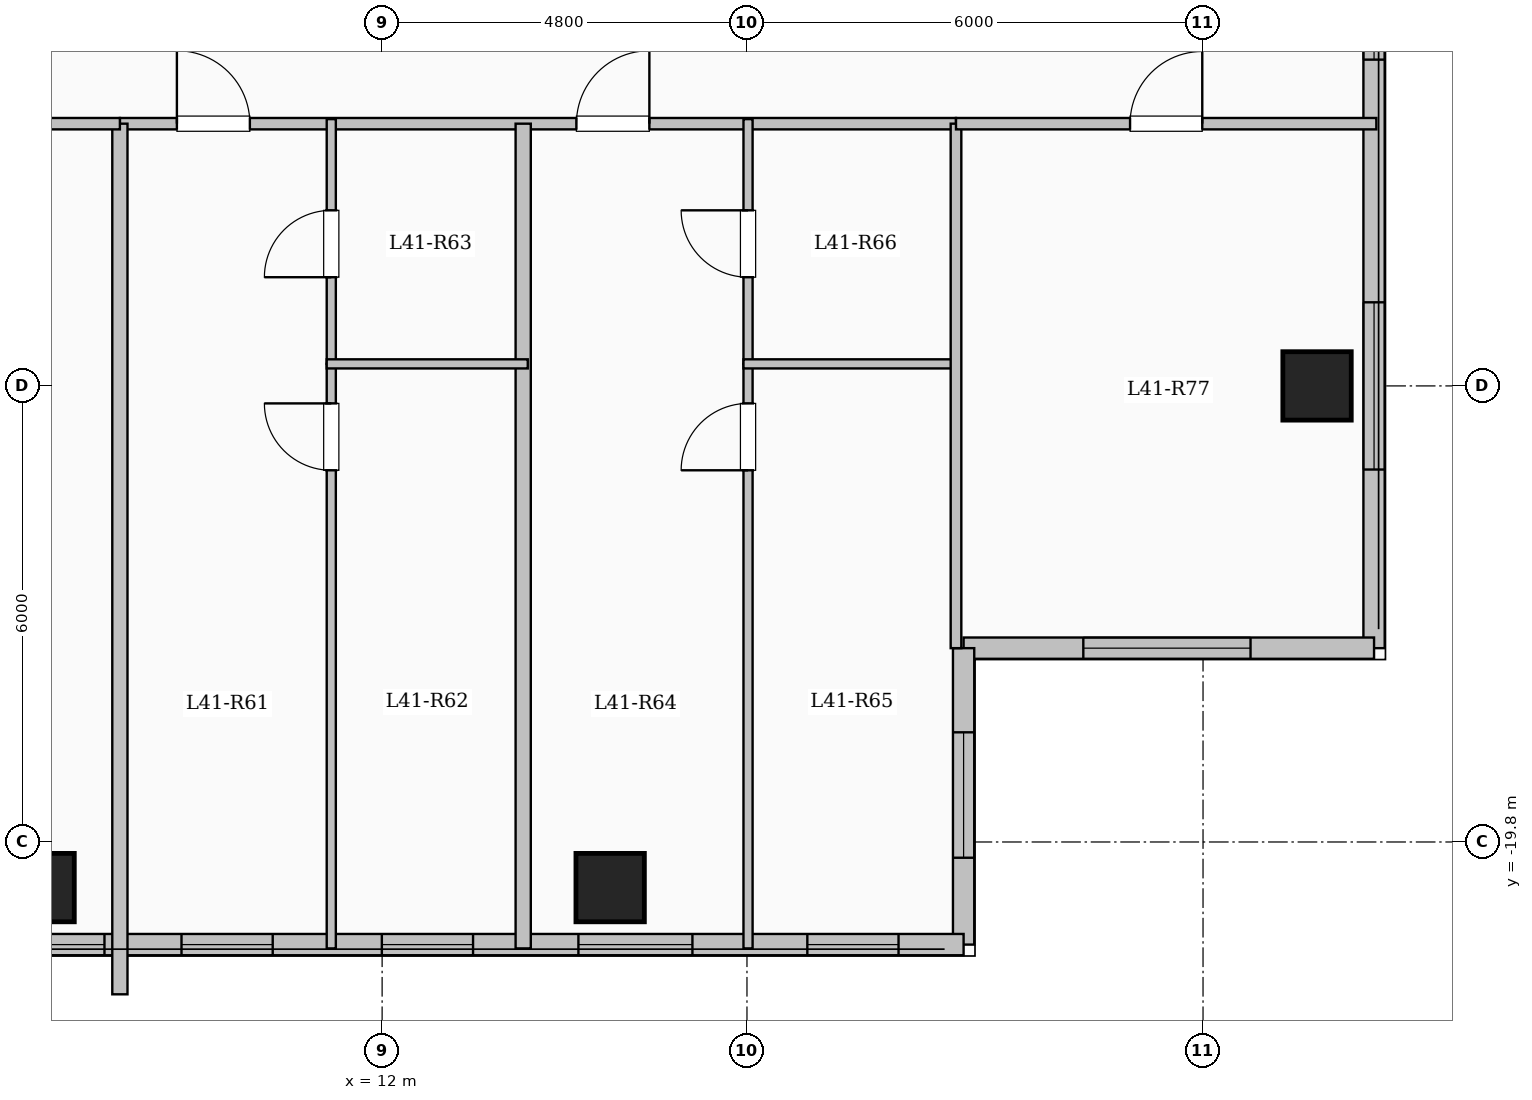
"""IFC4 building model, lengths in metres.
Left out: names, types, materials, properties, quantities, classifications, styles, units other than length and angle.
Written with IfcOpenShell. Run it as: python <this file> out.ifc"""

import sys

from ifc_helpers import new_model, si_unit, direction, frame, frame_2d, origin, origin_2d, place, context, subcontext, project, spatial, rectangle, extrude, element, fill, save


model = new_model("IFC4")
c1 = context("Model", 3, precision=1e-05, world=origin(), true_north=direction((0.0, 1.0)))
c2 = subcontext(c1, "Body", "Model", "MODEL_VIEW")
j1 = project(units=[si_unit("LENGTHUNIT", "METRE"), si_unit("PLANEANGLEUNIT", "RADIAN")], contexts=[c1])
p1 = place(None, origin())
s1 = spatial("IfcSite", under=j1, at=p1, CompositionType="ELEMENT")
p2 = place(p1, origin())
s2 = spatial("IfcBuilding", under=s1, at=p2, CompositionType="ELEMENT")
p3 = place(p2, frame((0.0, 0.0, 152.7)))
s3 = spatial("IfcBuildingStorey", under=s2, at=p3, CompositionType="ELEMENT", Elevation=152.7)
for number, where, z_axis, x_axis in (
    (1, (7.5, -20.4, 0.0), (0.0, 0.0, 1.0), (1.0, 0.0, 0.0)),
    (2, (15.0, -20.4, 0.0), (0.0, 0.0, 1.0), (1.0, 0.0, 0.0)),
    (3, (24.3, -13.8, 0.0), (0.0, 0.0, 1.0), (1.0, 0.0, 0.0)),
):
    element("IfcColumn", number, at=place(p3, frame(where, z_axis=z_axis, x_axis=x_axis)), inside=s3, PredefinedType="COLUMN", context=c2, shape_type="SweptSolid", body=[
        extrude(rectangle(XDim=0.9, YDim=0.9, at=origin_2d()), origin(), (0.0, 0.0, 1.0), 3.35),
    ])
p4 = place(p3, frame((25.05, 17.25, 0.0), z_axis=(0.0, 0.0, 1.0), x_axis=(0.0, -1.0, 0.0)))
e4 = element("IfcWall", 4, at=p4, inside=s3, PredefinedType="SOLIDWALL", context=c2, shape_type="SweptSolid", body=[
    extrude(rectangle(XDim=34.5, YDim=0.28, at=frame_2d((17.25, 0.0))), origin(), (0.0, 0.0, 1.0), 3.1),
])
p5 = place(p4, frame((1.375, 0.0, 0.9)))
e5 = element("IfcOpeningElement", 5, at=p5, cuts=e4, PredefinedType="OPENING", context=c2, shape_type="SweptSolid", body=[
    extrude(rectangle(XDim=2.0, YDim=1.7, at=frame_2d((1.0, 0.85))), frame((0.0, 0.15, 0.0), z_axis=(0.0, -1.0, 0.0), x_axis=(1.0, 0.0, 0.0)), (0.0, 0.0, 1.0), 0.3),
])
p6 = place(p4, frame((5.125, 0.0, 0.95)))
e6 = element("IfcOpeningElement", 6, at=p6, cuts=e4, PredefinedType="OPENING", context=c2, shape_type="SweptSolid", body=[
    extrude(rectangle(XDim=1.0, YDim=1.5, at=frame_2d((0.5, 0.75))), frame((0.0, 0.15, 0.0), z_axis=(0.0, -1.0, 0.0), x_axis=(1.0, 0.0, 0.0)), (0.0, 0.0, 1.0), 0.3),
])
p7 = place(p4, frame((14.5, 0.0, 0.9)))
e7 = element("IfcOpeningElement", 7, at=p7, cuts=e4, PredefinedType="OPENING", context=c2, shape_type="SweptSolid", body=[
    extrude(rectangle(XDim=2.0, YDim=1.7, at=frame_2d((1.0, 0.85))), frame((0.0, 0.15, 0.0), z_axis=(0.0, -1.0, 0.0), x_axis=(1.0, 0.0, 0.0)), (0.0, 0.0, 1.0), 0.3),
])
p8 = place(p4, frame((25.258, 0.0, 0.9)))
e8 = element("IfcOpeningElement", 8, at=p8, cuts=e4, PredefinedType="OPENING", context=c2, shape_type="SweptSolid", body=[
    extrude(rectangle(XDim=1.5, YDim=1.65, at=frame_2d((0.75, 0.825))), frame((0.0, 0.15, 0.0), z_axis=(0.0, -1.0, 0.0), x_axis=(1.0, 0.0, 0.0)), (0.0, 0.0, 1.0), 0.3),
])
p9 = place(p4, frame((29.95, 0.0, 0.9)))
e9 = element("IfcOpeningElement", 9, at=p9, cuts=e4, PredefinedType="OPENING", context=c2, shape_type="SweptSolid", body=[
    extrude(rectangle(XDim=2.2, YDim=1.75, at=frame_2d((1.1, 0.875))), frame((0.0, 0.15, 0.0), z_axis=(0.0, -1.0, 0.0), x_axis=(1.0, 0.0, 0.0)), (0.0, 0.0, 1.0), 0.3),
])
p10 = place(p3, frame((25.05, -17.25, 0.0), z_axis=(0.0, 0.0, 1.0), x_axis=(-1.0, 0.0, 0.0)))
e10 = element("IfcWall", 10, at=p10, inside=s3, PredefinedType="SOLIDWALL", context=c2, shape_type="SweptSolid", body=[
    extrude(rectangle(XDim=5.4, YDim=0.28, at=frame_2d((2.7, 0.0))), origin(), (0.0, 0.0, 1.0), 3.1),
])
p11 = place(p10, frame((1.625, 0.0, 0.9)))
e11 = element("IfcOpeningElement", 11, at=p11, cuts=e10, PredefinedType="OPENING", context=c2, shape_type="SweptSolid", body=[
    extrude(rectangle(XDim=2.2, YDim=1.75, at=frame_2d((1.1, 0.875))), frame((0.0, 0.15, 0.0), z_axis=(0.0, -1.0, 0.0), x_axis=(1.0, 0.0, 0.0)), (0.0, 0.0, 1.0), 0.3),
])
p12 = place(p3, frame((19.65, -17.25, 0.0), z_axis=(0.0, 0.0, 1.0), x_axis=(0.0, -1.0, 0.0)))
e12 = element("IfcWall", 12, at=p12, inside=s3, PredefinedType="SOLIDWALL", context=c2, shape_type="SweptSolid", body=[
    extrude(rectangle(XDim=3.9, YDim=0.28, at=frame_2d((1.95, 0.0))), origin(), (0.0, 0.0, 1.0), 3.1),
])
p13 = place(p12, frame((1.107, 0.0, 0.9)))
e13 = element("IfcOpeningElement", 13, at=p13, cuts=e12, PredefinedType="OPENING", context=c2, shape_type="SweptSolid", body=[
    extrude(rectangle(XDim=1.65, YDim=1.6, at=frame_2d((0.825, 0.8))), frame((0.0, 0.15, 0.0), z_axis=(0.0, -1.0, 0.0), x_axis=(1.0, 0.0, 0.0)), (0.0, 0.0, 1.0), 0.3),
])
p14 = place(p3, frame((19.65, -21.15, 0.0), z_axis=(0.0, 0.0, 1.0), x_axis=(-1.0, 0.0, 0.0)))
e14 = element("IfcWall", 14, at=p14, inside=s3, PredefinedType="SOLIDWALL", context=c2, shape_type="SweptSolid", body=[
    extrude(rectangle(XDim=12.3, YDim=0.28, at=frame_2d((6.15, 0.0))), origin(), (0.0, 0.0, 1.0), 3.1),
])
p15 = place(p14, frame((0.856, 0.0, 0.95)))
e15 = element("IfcOpeningElement", 15, at=p15, cuts=e14, PredefinedType="OPENING", context=c2, shape_type="SweptSolid", body=[
    extrude(rectangle(XDim=1.2, YDim=1.5, at=frame_2d((0.6, 0.75))), frame((0.0, 0.15, 0.0), z_axis=(0.0, -1.0, 0.0), x_axis=(1.0, 0.0, 0.0)), (0.0, 0.0, 1.0), 0.3),
])
p16 = place(p14, frame((3.568, 0.0, 0.9)))
e16 = element("IfcOpeningElement", 16, at=p16, cuts=e14, PredefinedType="OPENING", context=c2, shape_type="SweptSolid", body=[
    extrude(rectangle(XDim=1.5, YDim=1.65, at=frame_2d((0.75, 0.825))), frame((0.0, 0.15, 0.0), z_axis=(0.0, -1.0, 0.0), x_axis=(1.0, 0.0, 0.0)), (0.0, 0.0, 1.0), 0.3),
])
p17 = place(p14, frame((6.454, 0.0, 0.95)))
e17 = element("IfcOpeningElement", 17, at=p17, cuts=e14, PredefinedType="OPENING", context=c2, shape_type="SweptSolid", body=[
    extrude(rectangle(XDim=1.2, YDim=1.5, at=frame_2d((0.6, 0.75))), frame((0.0, 0.15, 0.0), z_axis=(0.0, -1.0, 0.0), x_axis=(1.0, 0.0, 0.0)), (0.0, 0.0, 1.0), 0.3),
])
p18 = place(p14, frame((9.089, 0.0, 0.95)))
e18 = element("IfcOpeningElement", 18, at=p18, cuts=e14, PredefinedType="OPENING", context=c2, shape_type="SweptSolid", body=[
    extrude(rectangle(XDim=1.2, YDim=1.5, at=frame_2d((0.6, 0.75))), frame((0.0, 0.15, 0.0), z_axis=(0.0, -1.0, 0.0), x_axis=(1.0, 0.0, 0.0)), (0.0, 0.0, 1.0), 0.3),
])
p19 = place(p14, frame((11.303, 0.0, 0.95)))
e19 = element("IfcOpeningElement", 19, at=p19, cuts=e14, PredefinedType="OPENING", context=c2, shape_type="SweptSolid", body=[
    extrude(rectangle(XDim=0.85, YDim=1.5, at=frame_2d((0.425, 0.75))), frame((0.0, 0.15, 0.0), z_axis=(0.0, -1.0, 0.0), x_axis=(1.0, 0.0, 0.0)), (0.0, 0.0, 1.0), 0.3),
])
p20 = place(p3, frame((8.55, -10.35, 0.0), z_axis=(0.0, 0.0, 1.0), x_axis=(1.0, 0.0, 0.0)))
e20 = element("IfcWall", 20, at=p20, inside=s3, PredefinedType="PARTITIONING", context=c2, shape_type="SweptSolid", body=[
    extrude(rectangle(XDim=11.0, YDim=0.15, at=frame_2d((5.5, 0.0))), origin(), (0.0, 0.0, 1.0), 3.1),
])
p21 = place(p20, frame((0.75, 0.0, 0.0)))
e21 = element("IfcOpeningElement", 21, at=p21, cuts=e20, PredefinedType="OPENING", context=c2, shape_type="SweptSolid", body=[
    extrude(rectangle(XDim=0.96, YDim=2.15, at=frame_2d((0.48, 1.075))), frame((0.0, 0.085, 0.0), z_axis=(0.0, -1.0, 0.0), x_axis=(1.0, 0.0, 0.0)), (0.0, 0.0, 1.0), 0.17),
])
p22 = place(p20, frame((6.006, 0.0, 0.0)))
e22 = element("IfcOpeningElement", 22, at=p22, cuts=e20, PredefinedType="OPENING", context=c2, shape_type="SweptSolid", body=[
    extrude(rectangle(XDim=0.96, YDim=2.15, at=frame_2d((0.48, 1.075))), frame((0.0, 0.085, 0.0), z_axis=(0.0, -1.0, 0.0), x_axis=(1.0, 0.0, 0.0)), (0.0, 0.0, 1.0), 0.17),
])
p23 = place(p3, frame((13.856, -21.2, 0.0), z_axis=(0.0, 0.0, 1.0), x_axis=(0.0, 1.0, 0.0)))
e23 = element("IfcWall", 23, at=p23, inside=s3, PredefinedType="SOLIDWALL", context=c2, shape_type="SweptSolid", body=[
    extrude(rectangle(XDim=10.85, YDim=0.2, at=frame_2d((5.425, 0.0))), origin(), (0.0, 0.0, 1.0), 3.1),
])
p24 = place(p3, frame((11.331, -21.2, 0.0), z_axis=(0.0, 0.0, 1.0), x_axis=(0.0, 1.0, 0.0)))
e24 = element("IfcWall", 24, at=p24, inside=s3, PredefinedType="PARTITIONING", context=c2, shape_type="SweptSolid", body=[
    extrude(rectangle(XDim=7.69, YDim=0.12, at=frame_2d((3.845, 0.0))), origin(), (0.0, 0.0, 1.0), 3.1),
])
p25 = place(p24, frame((6.29, 0.0, 0.0)))
e25 = element("IfcOpeningElement", 25, at=p25, cuts=e24, PredefinedType="OPENING", context=c2, shape_type="SweptSolid", body=[
    extrude(rectangle(XDim=0.88, YDim=2.1, at=frame_2d((0.44, 1.05))), frame((0.0, 0.07, 0.0), z_axis=(0.0, -1.0, 0.0), x_axis=(1.0, 0.0, 0.0)), (0.0, 0.0, 1.0), 0.14),
])
p26 = place(p3, frame((11.331, -13.51, 0.0), z_axis=(0.0, 0.0, 1.0), x_axis=(0.0, 1.0, 0.0)))
e26 = element("IfcWall", 26, at=p26, inside=s3, PredefinedType="PARTITIONING", context=c2, shape_type="SweptSolid", body=[
    extrude(rectangle(XDim=3.22, YDim=0.12, at=frame_2d((1.61, 0.0))), origin(), (0.0, 0.0, 1.0), 3.1),
])
p27 = place(p26, frame((1.14, 0.0, 0.0)))
e27 = element("IfcOpeningElement", 27, at=p27, cuts=e26, PredefinedType="OPENING", context=c2, shape_type="SweptSolid", body=[
    extrude(rectangle(XDim=0.88, YDim=2.1, at=frame_2d((0.44, 1.05))), frame((0.0, 0.07, 0.0), z_axis=(0.0, -1.0, 0.0), x_axis=(1.0, 0.0, 0.0)), (0.0, 0.0, 1.0), 0.14),
])
p28 = place(p3, frame((11.271, -13.51, 0.0), z_axis=(0.0, 0.0, 1.0), x_axis=(1.0, 0.0, 0.0)))
e28 = element("IfcWall", 28, at=p28, inside=s3, PredefinedType="PARTITIONING", context=c2, shape_type="SweptSolid", body=[
    extrude(rectangle(XDim=2.645, YDim=0.12, at=frame_2d((1.323, 0.0))), origin(), (0.0, 0.0, 1.0), 3.1),
])
p29 = place(p3, frame((16.814, -21.2, 0.0), z_axis=(0.0, 0.0, 1.0), x_axis=(0.0, 1.0, 0.0)))
e29 = element("IfcWall", 29, at=p29, inside=s3, PredefinedType="PARTITIONING", context=c2, shape_type="SweptSolid", body=[
    extrude(rectangle(XDim=7.69, YDim=0.12, at=frame_2d((3.845, 0.0))), origin(), (0.0, 0.0, 1.0), 3.1),
])
p30 = place(p29, frame((6.29, 0.0, 0.0)))
e30 = element("IfcOpeningElement", 30, at=p30, cuts=e29, PredefinedType="OPENING", context=c2, shape_type="SweptSolid", body=[
    extrude(rectangle(XDim=0.88, YDim=2.1, at=frame_2d((0.44, 1.05))), frame((0.0, 0.07, 0.0), z_axis=(0.0, -1.0, 0.0), x_axis=(1.0, 0.0, 0.0)), (0.0, 0.0, 1.0), 0.14),
])
p31 = place(p3, frame((16.814, -13.51, 0.0), z_axis=(0.0, 0.0, 1.0), x_axis=(0.0, 1.0, 0.0)))
e31 = element("IfcWall", 31, at=p31, inside=s3, PredefinedType="PARTITIONING", context=c2, shape_type="SweptSolid", body=[
    extrude(rectangle(XDim=3.22, YDim=0.12, at=frame_2d((1.61, 0.0))), origin(), (0.0, 0.0, 1.0), 3.1),
])
p32 = place(p31, frame((1.14, 0.0, 0.0)))
e32 = element("IfcOpeningElement", 32, at=p32, cuts=e31, PredefinedType="OPENING", context=c2, shape_type="SweptSolid", body=[
    extrude(rectangle(XDim=0.88, YDim=2.1, at=frame_2d((0.44, 1.05))), frame((0.0, 0.07, 0.0), z_axis=(0.0, -1.0, 0.0), x_axis=(1.0, 0.0, 0.0)), (0.0, 0.0, 1.0), 0.14),
])
p33 = place(p3, frame((16.754, -13.51, 0.0), z_axis=(0.0, 0.0, 1.0), x_axis=(1.0, 0.0, 0.0)))
e33 = element("IfcWall", 33, at=p33, inside=s3, PredefinedType="PARTITIONING", context=c2, shape_type="SweptSolid", body=[
    extrude(rectangle(XDim=2.856, YDim=0.12, at=frame_2d((1.428, 0.0))), origin(), (0.0, 0.0, 1.0), 3.1),
])
p34 = place(p3, frame((8.55, -21.804, 0.0), z_axis=(0.0, 0.0, 1.0), x_axis=(0.0, 1.0, 0.0)))
e34 = element("IfcWall", 34, at=p34, inside=s3, PredefinedType="SOLIDWALL", context=c2, shape_type="SweptSolid", body=[
    extrude(rectangle(XDim=11.454, YDim=0.2, at=frame_2d((5.727, 0.0))), origin(), (0.0, 0.0, 1.0), 3.1),
])
p35 = place(p3, frame((-8.55, -10.35, 0.0), z_axis=(0.0, 0.0, 1.0), x_axis=(1.0, 0.0, 0.0)))
e35 = element("IfcWall", 35, at=p35, inside=s3, PredefinedType="PARTITIONING", context=c2, shape_type="SweptSolid", body=[
    extrude(rectangle(XDim=17.1, YDim=0.15, at=frame_2d((8.55, 0.0))), origin(), (0.0, 0.0, 1.0), 3.1),
])
p36 = place(p35, frame((1.6, 0.0, 0.0)))
e36 = element("IfcOpeningElement", 36, at=p36, cuts=e35, PredefinedType="OPENING", context=c2, shape_type="SweptSolid", body=[
    extrude(rectangle(XDim=0.95, YDim=2.15, at=frame_2d((0.475, 1.075))), frame((0.0, 0.085, 0.0), z_axis=(0.0, -1.0, 0.0), x_axis=(1.0, 0.0, 0.0)), (0.0, 0.0, 1.0), 0.17),
])
p37 = place(p35, frame((10.5, 0.0, 0.0)))
e37 = element("IfcOpeningElement", 37, at=p37, cuts=e35, PredefinedType="OPENING", context=c2, shape_type="SweptSolid", body=[
    extrude(rectangle(XDim=0.95, YDim=2.15, at=frame_2d((0.475, 1.075))), frame((0.0, 0.085, 0.0), z_axis=(0.0, -1.0, 0.0), x_axis=(1.0, 0.0, 0.0)), (0.0, 0.0, 1.0), 0.17),
])
p38 = place(p3, frame((19.55, -17.25, 0.0), z_axis=(0.0, 0.0, 1.0), x_axis=(0.0, 1.0, 0.0)))
e38 = element("IfcWall", 38, at=p38, inside=s3, PredefinedType="PARTITIONING", context=c2, shape_type="SweptSolid", body=[
    extrude(rectangle(XDim=6.9, YDim=0.14, at=frame_2d((3.45, 0.0))), origin(), (0.0, 0.0, 1.0), 3.1),
])
p39 = place(p3, frame((19.55, -10.35, 0.0), z_axis=(0.0, 0.0, 1.0), x_axis=(1.0, 0.0, 0.0)))
e39 = element("IfcWall", 39, at=p39, inside=s3, PredefinedType="PARTITIONING", context=c2, shape_type="SweptSolid", body=[
    extrude(rectangle(XDim=5.53, YDim=0.15, at=frame_2d((2.765, 0.0))), origin(), (0.0, 0.0, 1.0), 3.1),
])
p40 = place(p39, frame((2.29, 0.0, 0.0)))
e40 = element("IfcOpeningElement", 40, at=p40, cuts=e39, PredefinedType="OPENING", context=c2, shape_type="SweptSolid", body=[
    extrude(rectangle(XDim=0.95, YDim=2.15, at=frame_2d((0.475, 1.075))), frame((0.0, 0.085, 0.0), z_axis=(0.0, -1.0, 0.0), x_axis=(1.0, 0.0, 0.0)), (0.0, 0.0, 1.0), 0.17),
])
p41 = place(p8, origin())
e41 = element("IfcWindow", 41, at=p41, inside=s3, PartitioningType="SINGLE_PANEL", PredefinedType="WINDOW", context=c2, shape_type="SweptSolid", body=[
    extrude(rectangle(XDim=1.5, YDim=1.65, at=frame_2d((0.75, 0.825))), frame((0.0, 0.03, 0.0), z_axis=(0.0, -1.0, 0.0), x_axis=(1.0, 0.0, 0.0)), (0.0, 0.0, 1.0), 0.06),
])
fill(e8, e41)
p42 = place(p9, origin())
e42 = element("IfcWindow", 42, at=p42, inside=s3, PartitioningType="SINGLE_PANEL", PredefinedType="WINDOW", context=c2, shape_type="SweptSolid", body=[
    extrude(rectangle(XDim=2.2, YDim=1.75, at=frame_2d((1.1, 0.875))), frame((0.0, 0.03, 0.0), z_axis=(0.0, -1.0, 0.0), x_axis=(1.0, 0.0, 0.0)), (0.0, 0.0, 1.0), 0.06),
])
fill(e9, e42)
p43 = place(p11, origin())
e43 = element("IfcWindow", 43, at=p43, inside=s3, PartitioningType="SINGLE_PANEL", PredefinedType="WINDOW", context=c2, shape_type="SweptSolid", body=[
    extrude(rectangle(XDim=2.2, YDim=1.75, at=frame_2d((1.1, 0.875))), frame((0.0, 0.03, 0.0), z_axis=(0.0, -1.0, 0.0), x_axis=(1.0, 0.0, 0.0)), (0.0, 0.0, 1.0), 0.06),
])
fill(e11, e43)
p44 = place(p13, origin())
e44 = element("IfcWindow", 44, at=p44, inside=s3, PartitioningType="SINGLE_PANEL", PredefinedType="WINDOW", context=c2, shape_type="SweptSolid", body=[
    extrude(rectangle(XDim=1.65, YDim=1.6, at=frame_2d((0.825, 0.8))), frame((0.0, 0.03, 0.0), z_axis=(0.0, -1.0, 0.0), x_axis=(1.0, 0.0, 0.0)), (0.0, 0.0, 1.0), 0.06),
])
fill(e13, e44)
p45 = place(p15, origin())
e45 = element("IfcWindow", 45, at=p45, inside=s3, PartitioningType="SINGLE_PANEL", PredefinedType="WINDOW", context=c2, shape_type="SweptSolid", body=[
    extrude(rectangle(XDim=1.2, YDim=1.5, at=frame_2d((0.6, 0.75))), frame((0.0, 0.03, 0.0), z_axis=(0.0, -1.0, 0.0), x_axis=(1.0, 0.0, 0.0)), (0.0, 0.0, 1.0), 0.06),
])
fill(e15, e45)
p46 = place(p16, origin())
e46 = element("IfcWindow", 46, at=p46, inside=s3, PartitioningType="SINGLE_PANEL", PredefinedType="WINDOW", context=c2, shape_type="SweptSolid", body=[
    extrude(rectangle(XDim=1.5, YDim=1.65, at=frame_2d((0.75, 0.825))), frame((0.0, 0.03, 0.0), z_axis=(0.0, -1.0, 0.0), x_axis=(1.0, 0.0, 0.0)), (0.0, 0.0, 1.0), 0.06),
])
fill(e16, e46)
p47 = place(p17, origin())
e47 = element("IfcWindow", 47, at=p47, inside=s3, PartitioningType="SINGLE_PANEL", PredefinedType="WINDOW", context=c2, shape_type="SweptSolid", body=[
    extrude(rectangle(XDim=1.2, YDim=1.5, at=frame_2d((0.6, 0.75))), frame((0.0, 0.03, 0.0), z_axis=(0.0, -1.0, 0.0), x_axis=(1.0, 0.0, 0.0)), (0.0, 0.0, 1.0), 0.06),
])
fill(e17, e47)
p48 = place(p18, origin())
e48 = element("IfcWindow", 48, at=p48, inside=s3, PartitioningType="SINGLE_PANEL", PredefinedType="WINDOW", context=c2, shape_type="SweptSolid", body=[
    extrude(rectangle(XDim=1.2, YDim=1.5, at=frame_2d((0.6, 0.75))), frame((0.0, 0.03, 0.0), z_axis=(0.0, -1.0, 0.0), x_axis=(1.0, 0.0, 0.0)), (0.0, 0.0, 1.0), 0.06),
])
fill(e18, e48)
p49 = place(p19, origin())
e49 = element("IfcWindow", 49, at=p49, inside=s3, PartitioningType="SINGLE_PANEL", PredefinedType="WINDOW", context=c2, shape_type="SweptSolid", body=[
    extrude(rectangle(XDim=0.85, YDim=1.5, at=frame_2d((0.425, 0.75))), frame((0.0, 0.03, 0.0), z_axis=(0.0, -1.0, 0.0), x_axis=(1.0, 0.0, 0.0)), (0.0, 0.0, 1.0), 0.06),
])
fill(e19, e49)
p50 = place(p21, origin())
e50 = element("IfcDoor", 50, at=p50, inside=s3, OperationType="SINGLE_SWING_LEFT", PredefinedType="DOOR", context=c2, shape_type="SweptSolid", body=[
    extrude(rectangle(XDim=0.96, YDim=2.15, at=frame_2d((0.48, 1.075))), frame((0.0, 0.025, 0.0), z_axis=(0.0, -1.0, 0.0), x_axis=(1.0, 0.0, 0.0)), (0.0, 0.0, 1.0), 0.05),
])
fill(e21, e50)
p51 = place(p25, origin())
e51 = element("IfcDoor", 51, at=p51, inside=s3, OperationType="SINGLE_SWING_RIGHT", PredefinedType="DOOR", context=c2, shape_type="SweptSolid", body=[
    extrude(rectangle(XDim=0.88, YDim=2.1, at=frame_2d((0.44, 1.05))), frame((0.0, 0.025, 0.0), z_axis=(0.0, -1.0, 0.0), x_axis=(1.0, 0.0, 0.0)), (0.0, 0.0, 1.0), 0.05),
])
fill(e25, e51)
p52 = place(p27, origin())
e52 = element("IfcDoor", 52, at=p52, inside=s3, OperationType="SINGLE_SWING_LEFT", PredefinedType="DOOR", context=c2, shape_type="SweptSolid", body=[
    extrude(rectangle(XDim=0.88, YDim=2.1, at=frame_2d((0.44, 1.05))), frame((0.0, 0.025, 0.0), z_axis=(0.0, -1.0, 0.0), x_axis=(1.0, 0.0, 0.0)), (0.0, 0.0, 1.0), 0.05),
])
fill(e27, e52)
p53 = place(p22, origin())
e53 = element("IfcDoor", 53, at=p53, inside=s3, OperationType="SINGLE_SWING_RIGHT", PredefinedType="DOOR", context=c2, shape_type="SweptSolid", body=[
    extrude(rectangle(XDim=0.96, YDim=2.15, at=frame_2d((0.48, 1.075))), frame((0.0, 0.025, 0.0), z_axis=(0.0, -1.0, 0.0), x_axis=(1.0, 0.0, 0.0)), (0.0, 0.0, 1.0), 0.05),
])
fill(e22, e53)
p54 = place(p30, origin())
e54 = element("IfcDoor", 54, at=p54, inside=s3, OperationType="SINGLE_SWING_LEFT", PredefinedType="DOOR", context=c2, shape_type="SweptSolid", body=[
    extrude(rectangle(XDim=0.88, YDim=2.1, at=frame_2d((0.44, 1.05))), frame((0.0, 0.025, 0.0), z_axis=(0.0, -1.0, 0.0), x_axis=(1.0, 0.0, 0.0)), (0.0, 0.0, 1.0), 0.05),
])
fill(e30, e54)
p55 = place(p32, origin())
e55 = element("IfcDoor", 55, at=p55, inside=s3, OperationType="SINGLE_SWING_RIGHT", PredefinedType="DOOR", context=c2, shape_type="SweptSolid", body=[
    extrude(rectangle(XDim=0.88, YDim=2.1, at=frame_2d((0.44, 1.05))), frame((0.0, 0.025, 0.0), z_axis=(0.0, -1.0, 0.0), x_axis=(1.0, 0.0, 0.0)), (0.0, 0.0, 1.0), 0.05),
])
fill(e32, e55)
p56 = place(p40, origin())
e56 = element("IfcDoor", 56, at=p56, inside=s3, OperationType="SINGLE_SWING_RIGHT", PredefinedType="DOOR", context=c2, shape_type="SweptSolid", body=[
    extrude(rectangle(XDim=0.95, YDim=2.15, at=frame_2d((0.475, 1.075))), frame((0.0, 0.025, 0.0), z_axis=(0.0, -1.0, 0.0), x_axis=(1.0, 0.0, 0.0)), (0.0, 0.0, 1.0), 0.05),
])
fill(e40, e56)
save(model, sys.argv[1])
